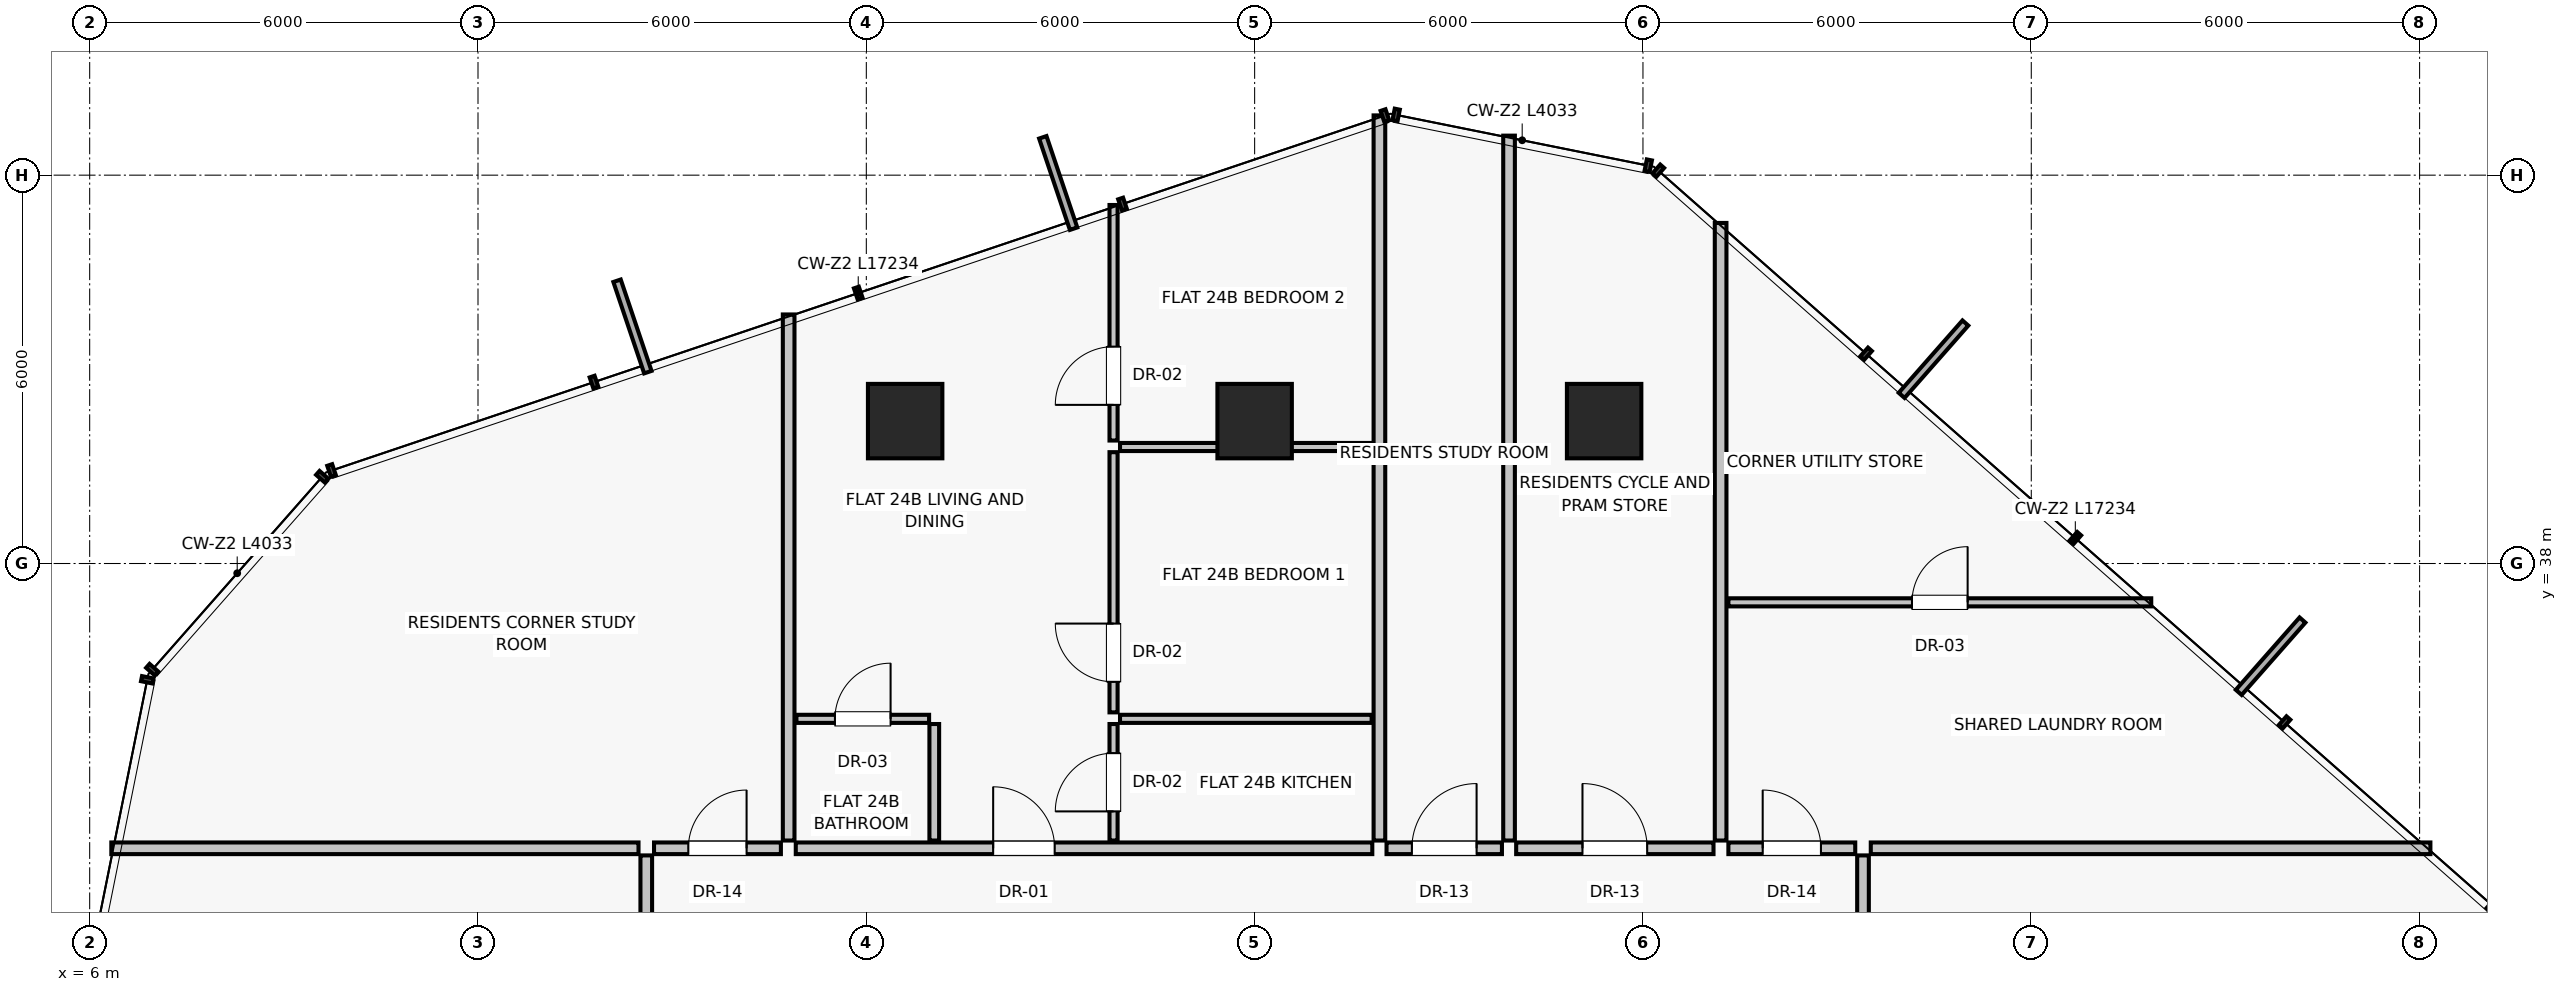
"""IFC4 building model, lengths in metres.
Left out: names, types, materials, properties, quantities, classifications, styles, units other than length and angle.
Written with IfcOpenShell. Run it as: python <this file> out.ifc"""

import sys

from ifc_helpers import new_model, si_unit, direction, frame, frame_2d, origin, origin_2d, place, context, subcontext, project, spatial, rectangle, extrude, source, transform, mapped, element, fill, save


model = new_model("IFC4")
c1 = context("Model", 3, precision=1e-05, world=origin(), true_north=direction((0.0, 1.0)))
c2 = subcontext(c1, "Body", "Model", "MODEL_VIEW")
j1 = project(units=[si_unit("LENGTHUNIT", "METRE"), si_unit("PLANEANGLEUNIT", "RADIAN")], contexts=[c1])
p1 = place(None, origin())
s1 = spatial("IfcSite", under=j1, at=p1, CompositionType="ELEMENT")
p2 = place(p1, origin())
s2 = spatial("IfcBuilding", under=s1, at=p2, CompositionType="ELEMENT")
p3 = place(p2, frame((0.0, 0.0, 89.45)))
s3 = spatial("IfcBuildingStorey", under=s2, at=p3, CompositionType="ELEMENT", Elevation=89.45)
for number, where, z_axis, x_axis in (
    (1, (29.4, 40.2, 0.0), (0.0, 0.0, 1.0), (1.0, 0.0, 0.0)),
    (2, (24.0, 40.2, 0.0), (0.0, 0.0, 1.0), (1.0, 0.0, 0.0)),
    (3, (18.6, 40.2, 0.0), (0.0, 0.0, 1.0), (1.0, 0.0, 0.0)),
):
    element("IfcColumn", number, at=place(p3, frame(where, z_axis=z_axis, x_axis=x_axis)), inside=s3, PredefinedType="COLUMN", context=c2, shape_type="SweptSolid", body=[
        extrude(rectangle(XDim=1.15, YDim=1.15, at=origin_2d()), origin(), (0.0, 0.0, 1.0), 3.25),
    ])
p4 = place(p3, frame((16.8, 33.72, 0.0), z_axis=(0.0, 0.0, 1.0), x_axis=(0.0, 1.0, 0.0)))
e4 = element("IfcWall", 4, at=p4, inside=s3, PredefinedType="PARTITIONING", context=c2, shape_type="SweptSolid", body=[
    extrude(rectangle(XDim=8.128, YDim=0.18, at=frame_2d((4.064, 0.0))), origin(), (0.0, 0.0, 1.0), 3.0),
])
p5 = place(p3, frame((31.2, 33.72, 0.0), z_axis=(0.0, 0.0, 1.0), x_axis=(0.0, 1.0, 0.0)))
e5 = element("IfcWall", 5, at=p5, inside=s3, PredefinedType="PARTITIONING", context=c2, shape_type="SweptSolid", body=[
    extrude(rectangle(XDim=9.542, YDim=0.18, at=frame_2d((4.771, 0.0))), origin(), (0.0, 0.0, 1.0), 3.0),
])
p6 = place(p3, frame((16.91, 33.6, 0.0), z_axis=(0.0, 0.0, 1.0), x_axis=(1.0, 0.0, 0.0)))
e6 = element("IfcWall", 6, at=p6, inside=s3, PredefinedType="PARTITIONING", context=c2, shape_type="SweptSolid", body=[
    extrude(rectangle(XDim=8.908, YDim=0.18, at=frame_2d((4.454, 0.0))), origin(), (0.0, 0.0, 1.0), 3.0),
])
p7 = place(p6, frame((3.05, 0.0, 0.0)))
e7 = element("IfcOpeningElement", 7, at=p7, cuts=e6, PredefinedType="OPENING", context=c2, shape_type="SweptSolid", body=[
    extrude(rectangle(XDim=0.95, YDim=2.02, at=frame_2d((0.475, 1.01))), frame((0.0, 0.1, 0.0), z_axis=(0.0, -1.0, 0.0), x_axis=(1.0, 0.0, 0.0)), (0.0, 0.0, 1.0), 0.2),
])
p8 = place(p3, frame((19.05, 33.72, 0.0), z_axis=(0.0, 0.0, 1.0), x_axis=(0.0, 1.0, 0.0)))
e8 = element("IfcWall", 8, at=p8, inside=s3, PredefinedType="PARTITIONING", context=c2, shape_type="SweptSolid", body=[
    extrude(rectangle(XDim=1.8, YDim=0.15, at=frame_2d((0.9, 0.0))), origin(), (0.0, 0.0, 1.0), 3.0),
])
p9 = place(p3, frame((16.92, 35.6, 0.0), z_axis=(0.0, 0.0, 1.0), x_axis=(1.0, 0.0, 0.0)))
e9 = element("IfcWall", 9, at=p9, inside=s3, PredefinedType="PARTITIONING", context=c2, shape_type="SweptSolid", body=[
    extrude(rectangle(XDim=2.05, YDim=0.125, at=frame_2d((1.025, 0.0))), origin(), (0.0, 0.0, 1.0), 2.58),
])
p10 = place(p9, frame((0.595, 0.0, 0.0)))
e10 = element("IfcOpeningElement", 10, at=p10, cuts=e9, PredefinedType="OPENING", context=c2, shape_type="SweptSolid", body=[
    extrude(rectangle(XDim=0.86, YDim=2.01, at=frame_2d((0.43, 1.005))), frame((0.0, 0.073, 0.0), z_axis=(0.0, -1.0, 0.0), x_axis=(1.0, 0.0, 0.0)), (0.0, 0.0, 1.0), 0.145),
])
p11 = place(p3, frame((21.82, 33.72, 0.0), z_axis=(0.0, 0.0, 1.0), x_axis=(0.0, 1.0, 0.0)))
e11 = element("IfcWall", 11, at=p11, inside=s3, PredefinedType="PARTITIONING", context=c2, shape_type="SweptSolid", body=[
    extrude(rectangle(XDim=1.8, YDim=0.125, at=frame_2d((0.9, 0.0))), origin(), (0.0, 0.0, 1.0), 3.0),
])
p12 = place(p11, frame((0.45, 0.0, 0.0)))
e12 = element("IfcOpeningElement", 12, at=p12, cuts=e11, PredefinedType="OPENING", context=c2, shape_type="SweptSolid", body=[
    extrude(rectangle(XDim=0.9, YDim=2.01, at=frame_2d((0.45, 1.005))), frame((0.0, 0.073, 0.0), z_axis=(0.0, -1.0, 0.0), x_axis=(1.0, 0.0, 0.0)), (0.0, 0.0, 1.0), 0.145),
])
p13 = place(p3, frame((21.92, 35.6, 0.0), z_axis=(0.0, 0.0, 1.0), x_axis=(1.0, 0.0, 0.0)))
e13 = element("IfcWall", 13, at=p13, inside=s3, PredefinedType="PARTITIONING", context=c2, shape_type="SweptSolid", body=[
    extrude(rectangle(XDim=3.888, YDim=0.125, at=frame_2d((1.944, 0.0))), origin(), (0.0, 0.0, 1.0), 2.58),
])
p14 = place(p3, frame((21.92, 39.8, 0.0), z_axis=(0.0, 0.0, 1.0), x_axis=(1.0, 0.0, 0.0)))
e14 = element("IfcWall", 14, at=p14, inside=s3, PredefinedType="PARTITIONING", context=c2, shape_type="SweptSolid", body=[
    extrude(rectangle(XDim=3.888, YDim=0.125, at=frame_2d((1.944, 0.0))), origin(), (0.0, 0.0, 1.0), 2.1),
])
p15 = place(p3, frame((21.82, 35.7, 0.0), z_axis=(0.0, 0.0, 1.0), x_axis=(0.0, 1.0, 0.0)))
e15 = element("IfcWall", 15, at=p15, inside=s3, PredefinedType="PARTITIONING", context=c2, shape_type="SweptSolid", body=[
    extrude(rectangle(XDim=4.02, YDim=0.125, at=frame_2d((2.01, 0.0))), origin(), (0.0, 0.0, 1.0), 3.0),
])
p16 = place(p15, frame((0.472, 0.0, 0.0)))
e16 = element("IfcOpeningElement", 16, at=p16, cuts=e15, PredefinedType="OPENING", context=c2, shape_type="SweptSolid", body=[
    extrude(rectangle(XDim=0.9, YDim=2.01, at=frame_2d((0.45, 1.005))), frame((0.0, 0.073, 0.0), z_axis=(0.0, -1.0, 0.0), x_axis=(1.0, 0.0, 0.0)), (0.0, 0.0, 1.0), 0.145),
])
p17 = place(p3, frame((21.82, 39.9, 0.0), z_axis=(0.0, 0.0, 1.0), x_axis=(0.0, 1.0, 0.0)))
e17 = element("IfcWall", 17, at=p17, inside=s3, PredefinedType="PARTITIONING", context=c2, shape_type="SweptSolid", body=[
    extrude(rectangle(XDim=3.639, YDim=0.125, at=frame_2d((1.82, 0.0))), origin(), (0.0, 0.0, 1.0), 3.0),
])
p18 = place(p17, frame((0.551, 0.0, 0.0)))
e18 = element("IfcOpeningElement", 18, at=p18, cuts=e17, PredefinedType="OPENING", context=c2, shape_type="SweptSolid", body=[
    extrude(rectangle(XDim=0.9, YDim=2.01, at=frame_2d((0.45, 1.005))), frame((0.0, 0.073, 0.0), z_axis=(0.0, -1.0, 0.0), x_axis=(1.0, 0.0, 0.0)), (0.0, 0.0, 1.0), 0.145),
])
p19 = place(p3, frame((25.928, 33.72, 0.0), z_axis=(0.0, 0.0, 1.0), x_axis=(0.0, 1.0, 0.0)))
e19 = element("IfcWall", 19, at=p19, inside=s3, PredefinedType="PARTITIONING", context=c2, shape_type="SweptSolid", body=[
    extrude(rectangle(XDim=11.203, YDim=0.18, at=frame_2d((5.602, 0.0))), origin(), (0.0, 0.0, 1.0), 3.0),
])
p20 = place(p3, frame((26.038, 33.6, 0.0), z_axis=(0.0, 0.0, 1.0), x_axis=(1.0, 0.0, 0.0)))
e20 = element("IfcWall", 20, at=p20, inside=s3, PredefinedType="PARTITIONING", context=c2, shape_type="SweptSolid", body=[
    extrude(rectangle(XDim=1.783, YDim=0.18, at=frame_2d((0.892, 0.0))), origin(), (0.0, 0.0, 1.0), 3.0),
])
p21 = place(p20, frame((0.392, 0.0, 0.0)))
e21 = element("IfcOpeningElement", 21, at=p21, cuts=e20, PredefinedType="OPENING", context=c2, shape_type="SweptSolid", body=[
    extrude(rectangle(XDim=1.0, YDim=2.01, at=frame_2d((0.5, 1.005))), frame((0.0, 0.1, 0.0), z_axis=(0.0, -1.0, 0.0), x_axis=(1.0, 0.0, 0.0)), (0.0, 0.0, 1.0), 0.2),
])
p22 = place(p3, frame((28.041, 33.6, 0.0), z_axis=(0.0, 0.0, 1.0), x_axis=(1.0, 0.0, 0.0)))
e22 = element("IfcWall", 22, at=p22, inside=s3, PredefinedType="PARTITIONING", context=c2, shape_type="SweptSolid", body=[
    extrude(rectangle(XDim=3.049, YDim=0.18, at=frame_2d((1.524, 0.0))), origin(), (0.0, 0.0, 1.0), 3.0),
])
p23 = place(p22, frame((1.024, 0.0, 0.0)))
e23 = element("IfcOpeningElement", 23, at=p23, cuts=e22, PredefinedType="OPENING", context=c2, shape_type="SweptSolid", body=[
    extrude(rectangle(XDim=1.0, YDim=2.01, at=frame_2d((0.5, 1.005))), frame((0.0, 0.1, 0.0), z_axis=(0.0, -1.0, 0.0), x_axis=(1.0, 0.0, 0.0)), (0.0, 0.0, 1.0), 0.2),
])
p24 = place(p3, frame((27.931, 33.72, 0.0), z_axis=(0.0, 0.0, 1.0), x_axis=(0.0, 1.0, 0.0)))
e24 = element("IfcWall", 24, at=p24, inside=s3, PredefinedType="PARTITIONING", context=c2, shape_type="SweptSolid", body=[
    extrude(rectangle(XDim=10.891, YDim=0.18, at=frame_2d((5.445, 0.0))), origin(), (0.0, 0.0, 1.0), 3.0),
])
p25 = place(p3, frame((14.48, 33.6, 0.0), z_axis=(0.0, 0.0, 1.0), x_axis=(-1.0, 0.0, 0.0)))
e25 = element("IfcWall", 25, at=p25, inside=s3, PredefinedType="PARTITIONING", context=c2, shape_type="SweptSolid", body=[
    extrude(rectangle(XDim=8.146, YDim=0.18, at=frame_2d((4.073, 0.0))), origin(), (0.0, 0.0, 1.0), 3.0),
])
p26 = place(p3, frame((14.6, 28.848, 0.0), z_axis=(0.0, 0.0, 1.0), x_axis=(0.0, 1.0, 0.0)))
e26 = element("IfcWall", 26, at=p26, inside=s3, PredefinedType="PARTITIONING", context=c2, shape_type="SweptSolid", body=[
    extrude(rectangle(XDim=4.642, YDim=0.18, at=frame_2d((2.321, 0.0))), origin(), (0.0, 0.0, 1.0), 3.0),
])
p27 = place(p26, frame((1.821, 0.0, 0.0)))
e27 = element("IfcOpeningElement", 27, at=p27, cuts=e26, PredefinedType="OPENING", context=c2, shape_type="SweptSolid", body=[
    extrude(rectangle(XDim=1.0, YDim=2.01, at=frame_2d((0.5, 1.005))), frame((0.0, 0.1, 0.0), z_axis=(0.0, -1.0, 0.0), x_axis=(1.0, 0.0, 0.0)), (0.0, 0.0, 1.0), 0.2),
])
p28 = place(p3, frame((33.52, 33.6, 0.0), z_axis=(0.0, 0.0, 1.0), x_axis=(1.0, 0.0, 0.0)))
e28 = element("IfcWall", 28, at=p28, inside=s3, PredefinedType="PARTITIONING", context=c2, shape_type="SweptSolid", body=[
    extrude(rectangle(XDim=8.647, YDim=0.18, at=frame_2d((4.323, 0.0))), origin(), (0.0, 0.0, 1.0), 3.0),
])
p29 = place(p3, frame((33.4, 27.158, 0.0), z_axis=(0.0, 0.0, 1.0), x_axis=(0.0, 1.0, 0.0)))
e29 = element("IfcWall", 29, at=p29, inside=s3, PredefinedType="PARTITIONING", context=c2, shape_type="SweptSolid", body=[
    extrude(rectangle(XDim=6.332, YDim=0.18, at=frame_2d((3.166, 0.0))), origin(), (0.0, 0.0, 1.0), 3.0),
])
p30 = place(p29, frame((3.887, 0.0, 0.0)))
e30 = element("IfcOpeningElement", 30, at=p30, cuts=e29, PredefinedType="OPENING", context=c2, shape_type="SweptSolid", body=[
    extrude(rectangle(XDim=0.95, YDim=2.02, at=frame_2d((0.475, 1.01))), frame((0.0, 0.1, 0.0), z_axis=(0.0, -1.0, 0.0), x_axis=(1.0, 0.0, 0.0)), (0.0, 0.0, 1.0), 0.2),
])
p31 = place(p3, frame((14.72, 33.6, 0.0), z_axis=(0.0, 0.0, 1.0), x_axis=(1.0, 0.0, 0.0)))
e31 = element("IfcWall", 31, at=p31, inside=s3, PredefinedType="PARTITIONING", context=c2, shape_type="SweptSolid", body=[
    extrude(rectangle(XDim=1.96, YDim=0.18, at=frame_2d((0.98, 0.0))), origin(), (0.0, 0.0, 1.0), 3.0),
])
p32 = place(p31, frame((0.53, 0.0, 0.0)))
e32 = element("IfcOpeningElement", 32, at=p32, cuts=e31, PredefinedType="OPENING", context=c2, shape_type="SweptSolid", body=[
    extrude(rectangle(XDim=0.9, YDim=2.01, at=frame_2d((0.45, 1.005))), frame((0.0, 0.1, 0.0), z_axis=(0.0, -1.0, 0.0), x_axis=(1.0, 0.0, 0.0)), (0.0, 0.0, 1.0), 0.2),
])
p33 = place(p3, frame((31.32, 33.6, 0.0), z_axis=(0.0, 0.0, 1.0), x_axis=(1.0, 0.0, 0.0)))
e33 = element("IfcWall", 33, at=p33, inside=s3, PredefinedType="PARTITIONING", context=c2, shape_type="SweptSolid", body=[
    extrude(rectangle(XDim=1.96, YDim=0.18, at=frame_2d((0.98, 0.0))), origin(), (0.0, 0.0, 1.0), 3.0),
])
p34 = place(p33, frame((0.53, 0.0, 0.0)))
e34 = element("IfcOpeningElement", 34, at=p34, cuts=e33, PredefinedType="OPENING", context=c2, shape_type="SweptSolid", body=[
    extrude(rectangle(XDim=0.9, YDim=2.01, at=frame_2d((0.45, 1.005))), frame((0.0, 0.1, 0.0), z_axis=(0.0, -1.0, 0.0), x_axis=(1.0, 0.0, 0.0)), (0.0, 0.0, 1.0), 0.2),
])
p35 = place(p3, frame((31.32, 37.4, 0.0), z_axis=(0.0, 0.0, 1.0), x_axis=(1.0, 0.0, 0.0)))
e35 = element("IfcWall", 35, at=p35, inside=s3, PredefinedType="PARTITIONING", context=c2, shape_type="SweptSolid", body=[
    extrude(rectangle(XDim=6.533, YDim=0.125, at=frame_2d((3.267, 0.0))), origin(), (0.0, 0.0, 1.0), 3.0),
])
p36 = place(p35, frame((2.837, 0.0, 0.0)))
e36 = element("IfcOpeningElement", 36, at=p36, cuts=e35, PredefinedType="OPENING", context=c2, shape_type="SweptSolid", body=[
    extrude(rectangle(XDim=0.86, YDim=2.01, at=frame_2d((0.43, 1.005))), frame((0.0, 0.073, 0.0), z_axis=(0.0, -1.0, 0.0), x_axis=(1.0, 0.0, 0.0)), (0.0, 0.0, 1.0), 0.145),
])
m1 = source(origin(), c2, "Body", "SweptSolid", [
    extrude(rectangle(XDim=0.95, YDim=2.02, at=frame_2d((0.475, 1.01))), frame((0.0, 0.025, 0.0), z_axis=(0.0, -1.0, 0.0), x_axis=(1.0, 0.0, 0.0)), (0.0, 0.0, 1.0), 0.05),
])
p37 = place(p7, origin())
e37 = element("IfcDoor", 37, at=p37, inside=s3, OperationType="SINGLE_SWING_LEFT", PredefinedType="DOOR", context=c2, shape_type="MappedRepresentation", body=[
    mapped(m1, transform((0.0, 0.0, 0.0), scale=1.0)),
])
fill(e7, e37)
m2 = source(origin(), c2, "Body", "SweptSolid", [
    extrude(rectangle(XDim=0.86, YDim=2.01, at=frame_2d((0.43, 1.005))), frame((0.0, 0.025, 0.0), z_axis=(0.0, -1.0, 0.0), x_axis=(1.0, 0.0, 0.0)), (0.0, 0.0, 1.0), 0.05),
])
p38 = place(p10, origin())
e38 = element("IfcDoor", 38, at=p38, inside=s3, OperationType="SINGLE_SWING_RIGHT", PredefinedType="DOOR", context=c2, shape_type="MappedRepresentation", body=[
    mapped(m2, transform((0.0, 0.0, 0.0), scale=1.0)),
])
fill(e10, e38)
m3 = source(origin(), c2, "Body", "SweptSolid", [
    extrude(rectangle(XDim=0.9, YDim=2.01, at=frame_2d((0.45, 1.005))), frame((0.0, 0.025, 0.0), z_axis=(0.0, -1.0, 0.0), x_axis=(1.0, 0.0, 0.0)), (0.0, 0.0, 1.0), 0.05),
])
p39 = place(p12, origin())
e39 = element("IfcDoor", 39, at=p39, inside=s3, OperationType="SINGLE_SWING_LEFT", PredefinedType="DOOR", context=c2, shape_type="MappedRepresentation", body=[
    mapped(m3, transform((0.0, 0.0, 0.0), scale=1.0)),
])
fill(e12, e39)
p40 = place(p16, origin())
e40 = element("IfcDoor", 40, at=p40, inside=s3, OperationType="SINGLE_SWING_RIGHT", PredefinedType="DOOR", context=c2, shape_type="MappedRepresentation", body=[
    mapped(m3, transform((0.0, 0.0, 0.0), scale=1.0)),
])
fill(e16, e40)
p41 = place(p18, origin())
e41 = element("IfcDoor", 41, at=p41, inside=s3, OperationType="SINGLE_SWING_LEFT", PredefinedType="DOOR", context=c2, shape_type="MappedRepresentation", body=[
    mapped(m3, transform((0.0, 0.0, 0.0), scale=1.0)),
])
fill(e18, e41)
m4 = source(origin(), c2, "Body", "SweptSolid", [
    extrude(rectangle(XDim=1.0, YDim=2.01, at=frame_2d((0.5, 1.005))), frame((0.0, 0.025, 0.0), z_axis=(0.0, -1.0, 0.0), x_axis=(1.0, 0.0, 0.0)), (0.0, 0.0, 1.0), 0.05),
])
p42 = place(p21, origin())
e42 = element("IfcDoor", 42, at=p42, inside=s3, OperationType="SINGLE_SWING_RIGHT", PredefinedType="DOOR", context=c2, shape_type="MappedRepresentation", body=[
    mapped(m4, transform((0.0, 0.0, 0.0), scale=1.0)),
])
fill(e21, e42)
p43 = place(p23, origin())
e43 = element("IfcDoor", 43, at=p43, inside=s3, OperationType="SINGLE_SWING_LEFT", PredefinedType="DOOR", context=c2, shape_type="MappedRepresentation", body=[
    mapped(m4, transform((0.0, 0.0, 0.0), scale=1.0)),
])
fill(e23, e43)
p44 = place(p32, origin())
e44 = element("IfcDoor", 44, at=p44, inside=s3, OperationType="SINGLE_SWING_RIGHT", PredefinedType="DOOR", context=c2, shape_type="MappedRepresentation", body=[
    mapped(m3, transform((0.0, 0.0, 0.0), scale=1.0)),
])
fill(e32, e44)
p45 = place(p34, origin())
e45 = element("IfcDoor", 45, at=p45, inside=s3, OperationType="SINGLE_SWING_LEFT", PredefinedType="DOOR", context=c2, shape_type="MappedRepresentation", body=[
    mapped(m3, transform((0.0, 0.0, 0.0), scale=1.0)),
])
fill(e34, e45)
p46 = place(p36, origin())
e46 = element("IfcDoor", 46, at=p46, inside=s3, OperationType="SINGLE_SWING_RIGHT", PredefinedType="DOOR", context=c2, shape_type="MappedRepresentation", body=[
    mapped(m2, transform((0.0, 0.0, 0.0), scale=1.0)),
])
fill(e36, e46)
save(model, sys.argv[1])
